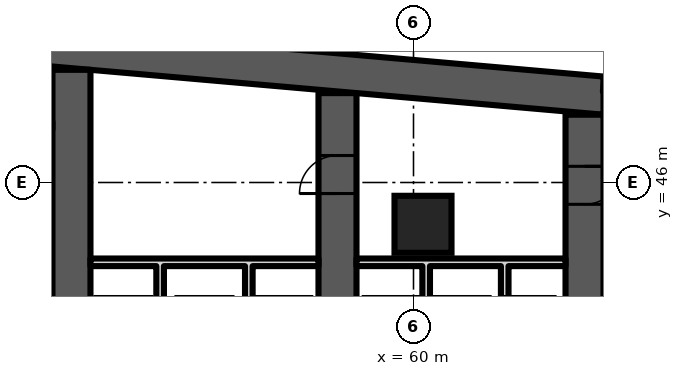
"""IFC4 building model, lengths in metres.
Left out: names, types, materials, properties, quantities, classifications, styles, units other than length and angle.
Written with IfcOpenShell. Run it as: python <this file> out.ifc"""

import sys

from ifc_helpers import new_model, si_unit, direction, frame, frame_2d, origin, origin_2d, place, context, subcontext, project, spatial, polyline, rectangle, outline, extrude, element, fill, save


model = new_model("IFC4")
c1 = context("Model", 3, precision=1e-05, world=origin(), true_north=direction((0.0, 1.0)))
c2 = subcontext(c1, "Body", "Model", "MODEL_VIEW")
j1 = project(units=[si_unit("LENGTHUNIT", "METRE"), si_unit("PLANEANGLEUNIT", "RADIAN")], contexts=[c1])
p1 = place(None, origin())
s1 = spatial("IfcSite", under=j1, at=p1, CompositionType="ELEMENT")
p2 = place(p1, origin())
s2 = spatial("IfcBuilding", under=s1, at=p2, CompositionType="ELEMENT")
p3 = place(p2, frame((0.0, 0.0, 147.1)))
s3 = spatial("IfcBuildingStorey", under=s2, at=p3, CompositionType="ELEMENT", Elevation=147.1)
p4 = place(p3, frame((0.0, 0.0, -0.0)))
e1 = element("IfcWall", 1, at=p4, inside=s3, PredefinedType="SHEAR", context=c2, shape_type="SweptSolid", body=[
    extrude(outline(polyline([(16.0, 47.784), (40.5, 49.927), (65.0, 47.784), (65.0, 48.787), (40.5, 50.931), (16.0, 48.787), (16.0, 47.784)])), origin(), (0.0, 0.0, 1.0), 4.8),
])
p5 = place(p3, frame((51.0, 35.0, 0.0), z_axis=(0.0, 0.0, 1.0), x_axis=(0.0, 1.0, 0.0)))
e2 = element("IfcWall", 2, at=p5, inside=s3, PredefinedType="SHEAR", context=c2, shape_type="SweptSolid", body=[
    extrude(rectangle(XDim=13.965, YDim=1.0, at=frame_2d((6.982, 0.0))), origin(), (0.0, 0.0, 1.0), 4.8),
])
p6 = place(p5, frame((3.4, 0.0, 0.0)))
e3 = element("IfcOpeningElement", 3, at=p6, cuts=e2, PredefinedType="OPENING", context=c2, shape_type="SweptSolid", body=[
    extrude(rectangle(XDim=1.1, YDim=2.1, at=frame_2d((0.55, 1.05))), frame((0.0, 0.51, 0.0), z_axis=(0.0, -1.0, 0.0), x_axis=(1.0, 0.0, 0.0)), (0.0, 0.0, 1.0), 1.02),
])
p7 = place(p3, frame((58.0, 35.0, 0.0), z_axis=(0.0, 0.0, 1.0), x_axis=(0.0, 1.0, 0.0)))
e4 = element("IfcWall", 4, at=p7, inside=s3, PredefinedType="SHEAR", context=c2, shape_type="SweptSolid", body=[
    extrude(rectangle(XDim=13.352, YDim=1.0, at=frame_2d((6.676, 0.0))), origin(), (0.0, 0.0, 1.0), 4.8),
])
p8 = place(p7, frame((10.71, 0.0, 0.0)))
e5 = element("IfcOpeningElement", 5, at=p8, cuts=e4, PredefinedType="OPENING", context=c2, shape_type="SweptSolid", body=[
    extrude(rectangle(XDim=1.0, YDim=2.1, at=frame_2d((0.5, 1.05))), frame((0.0, 0.51, 0.0), z_axis=(0.0, -1.0, 0.0), x_axis=(1.0, 0.0, 0.0)), (0.0, 0.0, 1.0), 1.02),
])
p9 = place(p7, frame((3.4, 0.0, 0.0)))
e6 = element("IfcOpeningElement", 6, at=p9, cuts=e4, PredefinedType="OPENING", context=c2, shape_type="SweptSolid", body=[
    extrude(rectangle(XDim=1.1, YDim=2.1, at=frame_2d((0.55, 1.05))), frame((0.0, 0.51, 0.0), z_axis=(0.0, -1.0, 0.0), x_axis=(1.0, 0.0, 0.0)), (0.0, 0.0, 1.0), 1.02),
])
p10 = place(p3, frame((64.5, 35.0, 0.0), z_axis=(0.0, 0.0, 1.0), x_axis=(0.0, 1.0, 0.0)))
e7 = element("IfcWall", 7, at=p10, inside=s3, PredefinedType="SHEAR", context=c2, shape_type="SweptSolid", body=[
    extrude(rectangle(XDim=12.784, YDim=1.0, at=frame_2d((6.392, 0.0))), origin(), (0.0, 0.0, 1.0), 4.8),
])
p11 = place(p10, frame((10.426, 0.0, 0.0)))
e8 = element("IfcOpeningElement", 8, at=p11, cuts=e7, PredefinedType="OPENING", context=c2, shape_type="SweptSolid", body=[
    extrude(rectangle(XDim=1.0, YDim=2.1, at=frame_2d((0.5, 1.05))), frame((0.0, 0.51, 0.0), z_axis=(0.0, -1.0, 0.0), x_axis=(1.0, 0.0, 0.0)), (0.0, 0.0, 1.0), 1.02),
])
p12 = place(p3, frame((60.25, 44.9, 0.0), z_axis=(0.0, 0.0, 1.0), x_axis=(1.0, 0.0, 0.0)))
e9 = element("IfcColumn", 9, at=p12, inside=s3, PredefinedType="COLUMN", context=c2, shape_type="SweptSolid", body=[
    extrude(rectangle(XDim=1.5, YDim=1.5, at=origin_2d()), origin(), (0.0, 0.0, 1.0), 4.8),
])
p13 = place(p3, frame((67.983, 48.326, 0.0), z_axis=(0.0, 0.0, 1.0), x_axis=(-0.996194, 0.087168, 0.0)))
e10 = element("IfcWall", 10, at=p13, inside=s3, PredefinedType="SOLIDWALL", context=c2, shape_type="SweptSolid", body=[
    extrude(rectangle(XDim=2.994, YDim=0.4, at=frame_2d((1.497, 0.0))), origin(), (0.0, 0.0, 1.0), 4.4),
])
p14 = place(p3, frame((0.0, 0.0, -0.0)))
e11 = element("IfcWall", 11, at=p14, inside=s3, PredefinedType="PARTITIONING", context=c2, shape_type="SweptSolid", body=[
    extrude(outline(polyline([(53.433, 40.8), (53.233, 40.8), (53.233, 43.8), (51.5, 43.8), (51.5, 44.0), (57.5, 44.0), (57.5, 43.8), (55.767, 43.8), (55.767, 40.8), (55.567, 40.8), (55.567, 43.8), (53.433, 43.8), (53.433, 40.8)])), origin(), (0.0, 0.0, 1.0), 4.4),
])
p15 = place(p3, frame((0.0, 0.0, -0.0)))
e12 = element("IfcWall", 12, at=p15, inside=s3, PredefinedType="PARTITIONING", context=c2, shape_type="SweptSolid", body=[
    extrude(outline(polyline([(60.433, 40.8), (60.233, 40.8), (60.233, 43.8), (58.5, 43.8), (58.5, 44.0), (64.0, 44.0), (64.0, 43.8), (62.5, 43.8), (62.5, 40.8), (62.3, 40.8), (62.3, 43.8), (60.433, 43.8), (60.433, 40.8)])), origin(), (0.0, 0.0, 1.0), 4.4),
])
p16 = place(p8, origin())
e13 = element("IfcDoor", 13, at=p16, inside=s3, OperationType="SINGLE_SWING_LEFT", PredefinedType="DOOR", context=c2, shape_type="SweptSolid", body=[
    extrude(rectangle(XDim=1.0, YDim=2.1, at=frame_2d((0.5, 1.05))), frame((0.0, 0.5, 0.0), z_axis=(0.0, -1.0, 0.0), x_axis=(1.0, 0.0, 0.0)), (0.0, 0.0, 1.0), 1.0),
])
fill(e5, e13)
p17 = place(p11, origin())
e14 = element("IfcDoor", 14, at=p17, inside=s3, OperationType="SINGLE_SWING_RIGHT", PredefinedType="DOOR", context=c2, shape_type="SweptSolid", body=[
    extrude(rectangle(XDim=1.0, YDim=2.1, at=frame_2d((0.5, 1.05))), frame((0.0, 0.5, 0.0), z_axis=(0.0, -1.0, 0.0), x_axis=(1.0, 0.0, 0.0)), (0.0, 0.0, 1.0), 1.0),
])
fill(e8, e14)
save(model, sys.argv[1])
